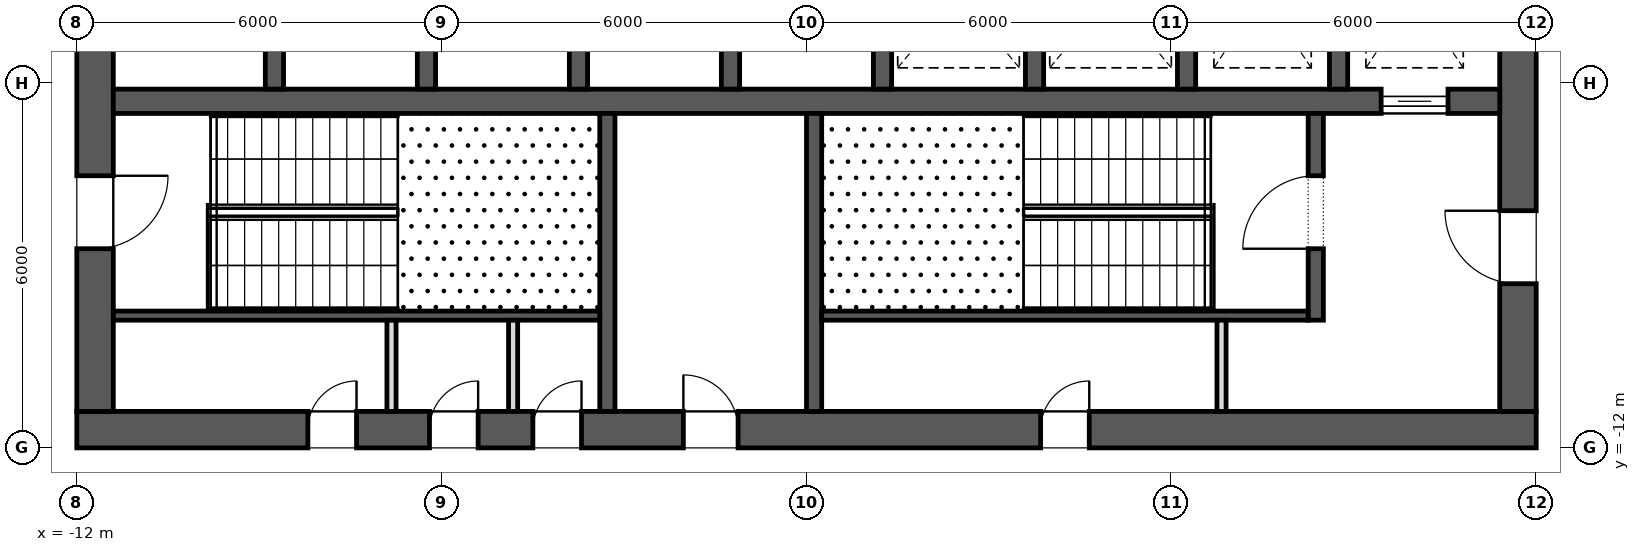
"""IFC4 building model, lengths in metres.
Left out: names, types, materials, properties, quantities, classifications, styles, units other than length and angle.
Written with IfcOpenShell. Run it as: python <this file> out.ifc"""

import sys

from ifc_helpers import new_model, si_unit, direction, frame, frame_2d, origin, place, context, subcontext, project, spatial, rectangle, extrude, element, fill, save


model = new_model("IFC4")
c1 = context("Model", 3, precision=1e-05, world=origin(), true_north=direction((0.0, 1.0)))
c2 = subcontext(c1, "Body", "Model", "MODEL_VIEW")
j1 = project(units=[si_unit("LENGTHUNIT", "METRE"), si_unit("PLANEANGLEUNIT", "RADIAN")], contexts=[c1])
p1 = place(None, origin())
s1 = spatial("IfcSite", under=j1, at=p1, CompositionType="ELEMENT")
p2 = place(p1, origin())
s2 = spatial("IfcBuilding", under=s1, at=p2, CompositionType="ELEMENT")
p3 = place(p2, frame((0.0, 0.0, 150.7)))
s3 = spatial("IfcBuildingStorey", under=s2, at=p3, CompositionType="ELEMENT", Elevation=150.7)
p4 = place(p3, frame((-12.0, -11.7, 0.0), z_axis=(0.0, 0.0, 1.0), x_axis=(1.0, 0.0, 0.0)))
e1 = element("IfcWall", 1, at=p4, inside=s3, PredefinedType="SHEAR", context=c2, shape_type="SweptSolid", body=[
    extrude(rectangle(XDim=24.0, YDim=0.6, at=frame_2d((12.0, 0.0))), origin(), (0.0, 0.0, 1.0), 4.2),
])
p5 = place(p4, frame((9.975, 0.0, 0.0)))
e2 = element("IfcOpeningElement", 2, at=p5, cuts=e1, PredefinedType="OPENING", context=c2, shape_type="SweptSolid", body=[
    extrude(rectangle(XDim=0.9, YDim=2.1, at=frame_2d((0.45, 1.05))), frame((0.0, 0.312, 0.0), z_axis=(0.0, -1.0, 0.0), x_axis=(1.0, 0.0, 0.0)), (0.0, 0.0, 1.0), 0.624),
])
p6 = place(p4, frame((3.8, 0.0, 0.0)))
e3 = element("IfcOpeningElement", 3, at=p6, cuts=e1, PredefinedType="OPENING", context=c2, shape_type="SweptSolid", body=[
    extrude(rectangle(XDim=0.8, YDim=2.1, at=frame_2d((0.4, 1.05))), frame((0.0, 0.312, 0.0), z_axis=(0.0, -1.0, 0.0), x_axis=(1.0, 0.0, 0.0)), (0.0, 0.0, 1.0), 0.624),
])
p7 = place(p4, frame((5.8, 0.0, 0.0)))
e4 = element("IfcOpeningElement", 4, at=p7, cuts=e1, PredefinedType="OPENING", context=c2, shape_type="SweptSolid", body=[
    extrude(rectangle(XDim=0.8, YDim=2.1, at=frame_2d((0.4, 1.05))), frame((0.0, 0.312, 0.0), z_axis=(0.0, -1.0, 0.0), x_axis=(1.0, 0.0, 0.0)), (0.0, 0.0, 1.0), 0.624),
])
p8 = place(p4, frame((7.5, 0.0, 0.0)))
e5 = element("IfcOpeningElement", 5, at=p8, cuts=e1, PredefinedType="OPENING", context=c2, shape_type="SweptSolid", body=[
    extrude(rectangle(XDim=0.8, YDim=2.1, at=frame_2d((0.4, 1.05))), frame((0.0, 0.312, 0.0), z_axis=(0.0, -1.0, 0.0), x_axis=(1.0, 0.0, 0.0)), (0.0, 0.0, 1.0), 0.624),
])
p9 = place(p4, frame((15.85, 0.0, 0.0)))
e6 = element("IfcOpeningElement", 6, at=p9, cuts=e1, PredefinedType="OPENING", context=c2, shape_type="SweptSolid", body=[
    extrude(rectangle(XDim=0.8, YDim=2.1, at=frame_2d((0.4, 1.05))), frame((0.0, 0.312, 0.0), z_axis=(0.0, -1.0, 0.0), x_axis=(1.0, 0.0, 0.0)), (0.0, 0.0, 1.0), 0.624),
])
p10 = place(p3, frame((11.7, -11.4, 0.0), z_axis=(0.0, 0.0, 1.0), x_axis=(0.0, 1.0, 0.0)))
e7 = element("IfcWall", 7, at=p10, inside=s3, PredefinedType="SHEAR", context=c2, shape_type="SweptSolid", body=[
    extrude(rectangle(XDim=22.8, YDim=0.6, at=frame_2d((11.4, 0.0))), origin(), (0.0, 0.0, 1.0), 4.2),
])
p11 = place(p10, frame((10.2, 0.0, 0.0)))
e8 = element("IfcOpeningElement", 8, at=p11, cuts=e7, PredefinedType="OPENING", context=c2, shape_type="SweptSolid", body=[
    extrude(rectangle(XDim=2.4, YDim=2.1, at=frame_2d((1.2, 1.05))), frame((0.0, 0.312, 0.0), z_axis=(0.0, -1.0, 0.0), x_axis=(1.0, 0.0, 0.0)), (0.0, 0.0, 1.0), 0.624),
])
p12 = place(p10, frame((19.5, 0.0, 0.0)))
e9 = element("IfcOpeningElement", 9, at=p12, cuts=e7, PredefinedType="OPENING", context=c2, shape_type="SweptSolid", body=[
    extrude(rectangle(XDim=1.2, YDim=2.1, at=frame_2d((0.6, 1.05))), frame((0.0, 0.312, 0.0), z_axis=(0.0, -1.0, 0.0), x_axis=(1.0, 0.0, 0.0)), (0.0, 0.0, 1.0), 0.624),
])
p13 = place(p10, frame((2.1, 0.0, 0.0)))
e10 = element("IfcOpeningElement", 10, at=p13, cuts=e7, PredefinedType="OPENING", context=c2, shape_type="SweptSolid", body=[
    extrude(rectangle(XDim=1.2, YDim=2.1, at=frame_2d((0.6, 1.05))), frame((0.0, 0.312, 0.0), z_axis=(0.0, -1.0, 0.0), x_axis=(1.0, 0.0, 0.0)), (0.0, 0.0, 1.0), 0.624),
])
p14 = place(p3, frame((-11.7, -11.4, 0.0), z_axis=(0.0, 0.0, 1.0), x_axis=(0.0, 1.0, 0.0)))
e11 = element("IfcWall", 11, at=p14, inside=s3, PredefinedType="SHEAR", context=c2, shape_type="SweptSolid", body=[
    extrude(rectangle(XDim=22.8, YDim=0.6, at=frame_2d((11.4, 0.0))), origin(), (0.0, 0.0, 1.0), 4.2),
])
p15 = place(p14, frame((10.2, 0.0, 0.0)))
e12 = element("IfcOpeningElement", 12, at=p15, cuts=e11, PredefinedType="OPENING", context=c2, shape_type="SweptSolid", body=[
    extrude(rectangle(XDim=2.4, YDim=2.1, at=frame_2d((1.2, 1.05))), frame((0.0, 0.312, 0.0), z_axis=(0.0, -1.0, 0.0), x_axis=(1.0, 0.0, 0.0)), (0.0, 0.0, 1.0), 0.624),
])
p16 = place(p14, frame((18.925, 0.0, 0.0)))
e13 = element("IfcOpeningElement", 13, at=p16, cuts=e11, PredefinedType="OPENING", context=c2, shape_type="SweptSolid", body=[
    extrude(rectangle(XDim=1.2, YDim=2.1, at=frame_2d((0.6, 1.05))), frame((0.0, 0.312, 0.0), z_axis=(0.0, -1.0, 0.0), x_axis=(1.0, 0.0, 0.0)), (0.0, 0.0, 1.0), 0.624),
])
p17 = place(p14, frame((2.675, 0.0, 0.0)))
e14 = element("IfcOpeningElement", 14, at=p17, cuts=e11, PredefinedType="OPENING", context=c2, shape_type="SweptSolid", body=[
    extrude(rectangle(XDim=1.2, YDim=2.1, at=frame_2d((0.6, 1.05))), frame((0.0, 0.312, 0.0), z_axis=(0.0, -1.0, 0.0), x_axis=(1.0, 0.0, 0.0)), (0.0, 0.0, 1.0), 0.624),
])
p18 = place(p3, frame((-11.4, -6.3, 0.0), z_axis=(0.0, 0.0, 1.0), x_axis=(1.0, 0.0, 0.0)))
e15 = element("IfcWall", 15, at=p18, inside=s3, PredefinedType="SHEAR", context=c2, shape_type="SweptSolid", body=[
    extrude(rectangle(XDim=22.8, YDim=0.4, at=frame_2d((11.4, 0.0))), origin(), (0.0, 0.0, 1.0), 4.2),
])
p19 = place(p18, frame((20.85, 0.0, 0.0)))
e16 = element("IfcOpeningElement", 16, at=p19, cuts=e15, PredefinedType="OPENING", context=c2, shape_type="SweptSolid", body=[
    extrude(rectangle(XDim=1.1, YDim=2.1, at=frame_2d((0.55, 1.05))), frame((0.0, 0.212, 0.0), z_axis=(0.0, -1.0, 0.0), x_axis=(1.0, 0.0, 0.0)), (0.0, 0.0, 1.0), 0.424),
])
for number, where, z_axis, x_axis in (
    (17, (-8.75, -6.1, 0.0), (0.0, 0.0, 1.0), (0.0, 1.0, 0.0)),
    (18, (-6.25, -6.1, 0.0), (0.0, 0.0, 1.0), (0.0, 1.0, 0.0)),
    (19, (-3.75, -6.1, 0.0), (0.0, 0.0, 1.0), (0.0, 1.0, 0.0)),
    (20, (-1.25, -6.1, 0.0), (0.0, 0.0, 1.0), (0.0, 1.0, 0.0)),
    (21, (1.25, -6.1, 0.0), (0.0, 0.0, 1.0), (0.0, 1.0, 0.0)),
    (22, (3.75, -6.1, 0.0), (0.0, 0.0, 1.0), (0.0, 1.0, 0.0)),
    (23, (6.25, -6.1, 0.0), (0.0, 0.0, 1.0), (0.0, 1.0, 0.0)),
    (24, (8.75, -6.1, 0.0), (0.0, 0.0, 1.0), (0.0, 1.0, 0.0)),
):
    element("IfcWall", number, at=place(p3, frame(where, z_axis=z_axis, x_axis=x_axis)), inside=s3, PredefinedType="SHEAR", context=c2, shape_type="SweptSolid", body=[
        extrude(rectangle(XDim=2.9, YDim=0.3, at=frame_2d((1.45, 0.0))), origin(), (0.0, 0.0, 1.0), 4.2),
    ])
for number, where, z_axis, x_axis in (
    (25, (-3.275, -11.4, 0.0), (0.0, 0.0, 1.0), (0.0, 1.0, 0.0)),
    (26, (0.125, -11.4, 0.0), (0.0, 0.0, 1.0), (0.0, 1.0, 0.0)),
):
    element("IfcWall", number, at=place(p3, frame(where, z_axis=z_axis, x_axis=x_axis)), inside=s3, PredefinedType="SHEAR", context=c2, shape_type="SweptSolid", body=[
        extrude(rectangle(XDim=4.9, YDim=0.25, at=frame_2d((2.45, 0.0))), origin(), (0.0, 0.0, 1.0), 3.9),
    ])
p20 = place(p3, frame((8.375, -9.9, 0.0), z_axis=(0.0, 0.0, 1.0), x_axis=(0.0, 1.0, 0.0)))
e27 = element("IfcWall", 27, at=p20, inside=s3, PredefinedType="SHEAR", context=c2, shape_type="SweptSolid", body=[
    extrude(rectangle(XDim=3.4, YDim=0.25, at=frame_2d((1.7, 0.0))), origin(), (0.0, 0.0, 1.0), 3.9),
])
p21 = place(p20, frame((1.175, 0.0, 0.0)))
e28 = element("IfcOpeningElement", 28, at=p21, cuts=e27, PredefinedType="OPENING", context=c2, shape_type="SweptSolid", body=[
    extrude(rectangle(XDim=1.2, YDim=2.1, at=frame_2d((0.6, 1.05))), frame((0.0, 0.137, 0.0), z_axis=(0.0, -1.0, 0.0), x_axis=(1.0, 0.0, 0.0)), (0.0, 0.0, 1.0), 0.274),
])
for number, where, z_axis, x_axis in (
    (29, (-11.4, -9.825, 0.0), (0.0, 0.0, 1.0), (1.0, 0.0, 0.0)),
    (30, (0.25, -9.825, 0.0), (0.0, 0.0, 1.0), (1.0, 0.0, 0.0)),
):
    element("IfcWall", number, at=place(p3, frame(where, z_axis=z_axis, x_axis=x_axis)), inside=s3, PredefinedType="SHEAR", context=c2, shape_type="SweptSolid", body=[
        extrude(rectangle(XDim=8.0, YDim=0.15, at=frame_2d((4.0, 0.0))), origin(), (0.0, 0.0, 1.0), 3.9),
    ])
for number, where, z_axis, x_axis in (
    (31, (-6.825, -11.4, 0.0), (0.0, 0.0, 1.0), (0.0, 1.0, 0.0)),
    (32, (-4.825, -11.4, 0.0), (0.0, 0.0, 1.0), (0.0, 1.0, 0.0)),
    (33, (6.825, -11.4, 0.0), (0.0, 0.0, 1.0), (0.0, 1.0, 0.0)),
):
    element("IfcWall", number, at=place(p3, frame(where, z_axis=z_axis, x_axis=x_axis)), inside=s3, PredefinedType="PARTITIONING", context=c2, shape_type="SweptSolid", body=[
        extrude(rectangle(XDim=1.5, YDim=0.15, at=frame_2d((0.75, 0.0))), origin(), (0.0, 0.0, 1.0), 3.9),
    ])
p22 = place(p19, origin())
e34 = element("IfcDoor", 34, at=p22, inside=s3, OperationType="SLIDING_TO_LEFT", PredefinedType="DOOR", context=c2, shape_type="SweptSolid", body=[
    extrude(rectangle(XDim=1.1, YDim=2.1, at=frame_2d((0.55, 1.05))), frame((0.0, 0.025, 0.0), z_axis=(0.0, -1.0, 0.0), x_axis=(1.0, 0.0, 0.0)), (0.0, 0.0, 1.0), 0.05),
])
fill(e16, e34)
p23 = place(p17, frame((1.2, 0.0, 0.0), z_axis=(0.0, 0.0, 1.0), x_axis=(-1.0, 0.0, 0.0)))
e35 = element("IfcDoor", 35, at=p23, inside=s3, OperationType="SINGLE_SWING_RIGHT", PredefinedType="DOOR", context=c2, shape_type="SweptSolid", body=[
    extrude(rectangle(XDim=1.2, YDim=2.1, at=frame_2d((0.6, 1.05))), frame((0.0, 0.025, 0.0), z_axis=(0.0, -1.0, 0.0), x_axis=(1.0, 0.0, 0.0)), (0.0, 0.0, 1.0), 0.05),
])
fill(e14, e35)
p24 = place(p21, origin())
e36 = element("IfcDoor", 36, at=p24, inside=s3, OperationType="SINGLE_SWING_RIGHT", PredefinedType="DOOR", context=c2, shape_type="SweptSolid", body=[
    extrude(rectangle(XDim=1.2, YDim=2.1, at=frame_2d((0.6, 1.05))), frame((0.0, 0.025, 0.0), z_axis=(0.0, -1.0, 0.0), x_axis=(1.0, 0.0, 0.0)), (0.0, 0.0, 1.0), 0.05),
])
fill(e28, e36)
p25 = place(p13, origin())
e37 = element("IfcDoor", 37, at=p25, inside=s3, OperationType="SINGLE_SWING_LEFT", PredefinedType="DOOR", context=c2, shape_type="SweptSolid", body=[
    extrude(rectangle(XDim=1.2, YDim=2.1, at=frame_2d((0.6, 1.05))), frame((0.0, 0.025, 0.0), z_axis=(0.0, -1.0, 0.0), x_axis=(1.0, 0.0, 0.0)), (0.0, 0.0, 1.0), 0.05),
])
fill(e10, e37)
p26 = place(p5, origin())
e38 = element("IfcDoor", 38, at=p26, inside=s3, OperationType="SINGLE_SWING_RIGHT", PredefinedType="DOOR", context=c2, shape_type="SweptSolid", body=[
    extrude(rectangle(XDim=0.9, YDim=2.1, at=frame_2d((0.45, 1.05))), frame((0.0, 0.025, 0.0), z_axis=(0.0, -1.0, 0.0), x_axis=(1.0, 0.0, 0.0)), (0.0, 0.0, 1.0), 0.05),
])
fill(e2, e38)
p27 = place(p6, origin())
e39 = element("IfcDoor", 39, at=p27, inside=s3, OperationType="SINGLE_SWING_LEFT", PredefinedType="DOOR", context=c2, shape_type="SweptSolid", body=[
    extrude(rectangle(XDim=0.8, YDim=2.1, at=frame_2d((0.4, 1.05))), frame((0.0, 0.025, 0.0), z_axis=(0.0, -1.0, 0.0), x_axis=(1.0, 0.0, 0.0)), (0.0, 0.0, 1.0), 0.05),
])
fill(e3, e39)
p28 = place(p7, origin())
e40 = element("IfcDoor", 40, at=p28, inside=s3, OperationType="SINGLE_SWING_LEFT", PredefinedType="DOOR", context=c2, shape_type="SweptSolid", body=[
    extrude(rectangle(XDim=0.8, YDim=2.1, at=frame_2d((0.4, 1.05))), frame((0.0, 0.025, 0.0), z_axis=(0.0, -1.0, 0.0), x_axis=(1.0, 0.0, 0.0)), (0.0, 0.0, 1.0), 0.05),
])
fill(e4, e40)
p29 = place(p8, origin())
e41 = element("IfcDoor", 41, at=p29, inside=s3, OperationType="SINGLE_SWING_LEFT", PredefinedType="DOOR", context=c2, shape_type="SweptSolid", body=[
    extrude(rectangle(XDim=0.8, YDim=2.1, at=frame_2d((0.4, 1.05))), frame((0.0, 0.025, 0.0), z_axis=(0.0, -1.0, 0.0), x_axis=(1.0, 0.0, 0.0)), (0.0, 0.0, 1.0), 0.05),
])
fill(e5, e41)
p30 = place(p9, origin())
e42 = element("IfcDoor", 42, at=p30, inside=s3, OperationType="SINGLE_SWING_LEFT", PredefinedType="DOOR", context=c2, shape_type="SweptSolid", body=[
    extrude(rectangle(XDim=0.8, YDim=2.1, at=frame_2d((0.4, 1.05))), frame((0.0, 0.025, 0.0), z_axis=(0.0, -1.0, 0.0), x_axis=(1.0, 0.0, 0.0)), (0.0, 0.0, 1.0), 0.05),
])
fill(e6, e42)
save(model, sys.argv[1])
